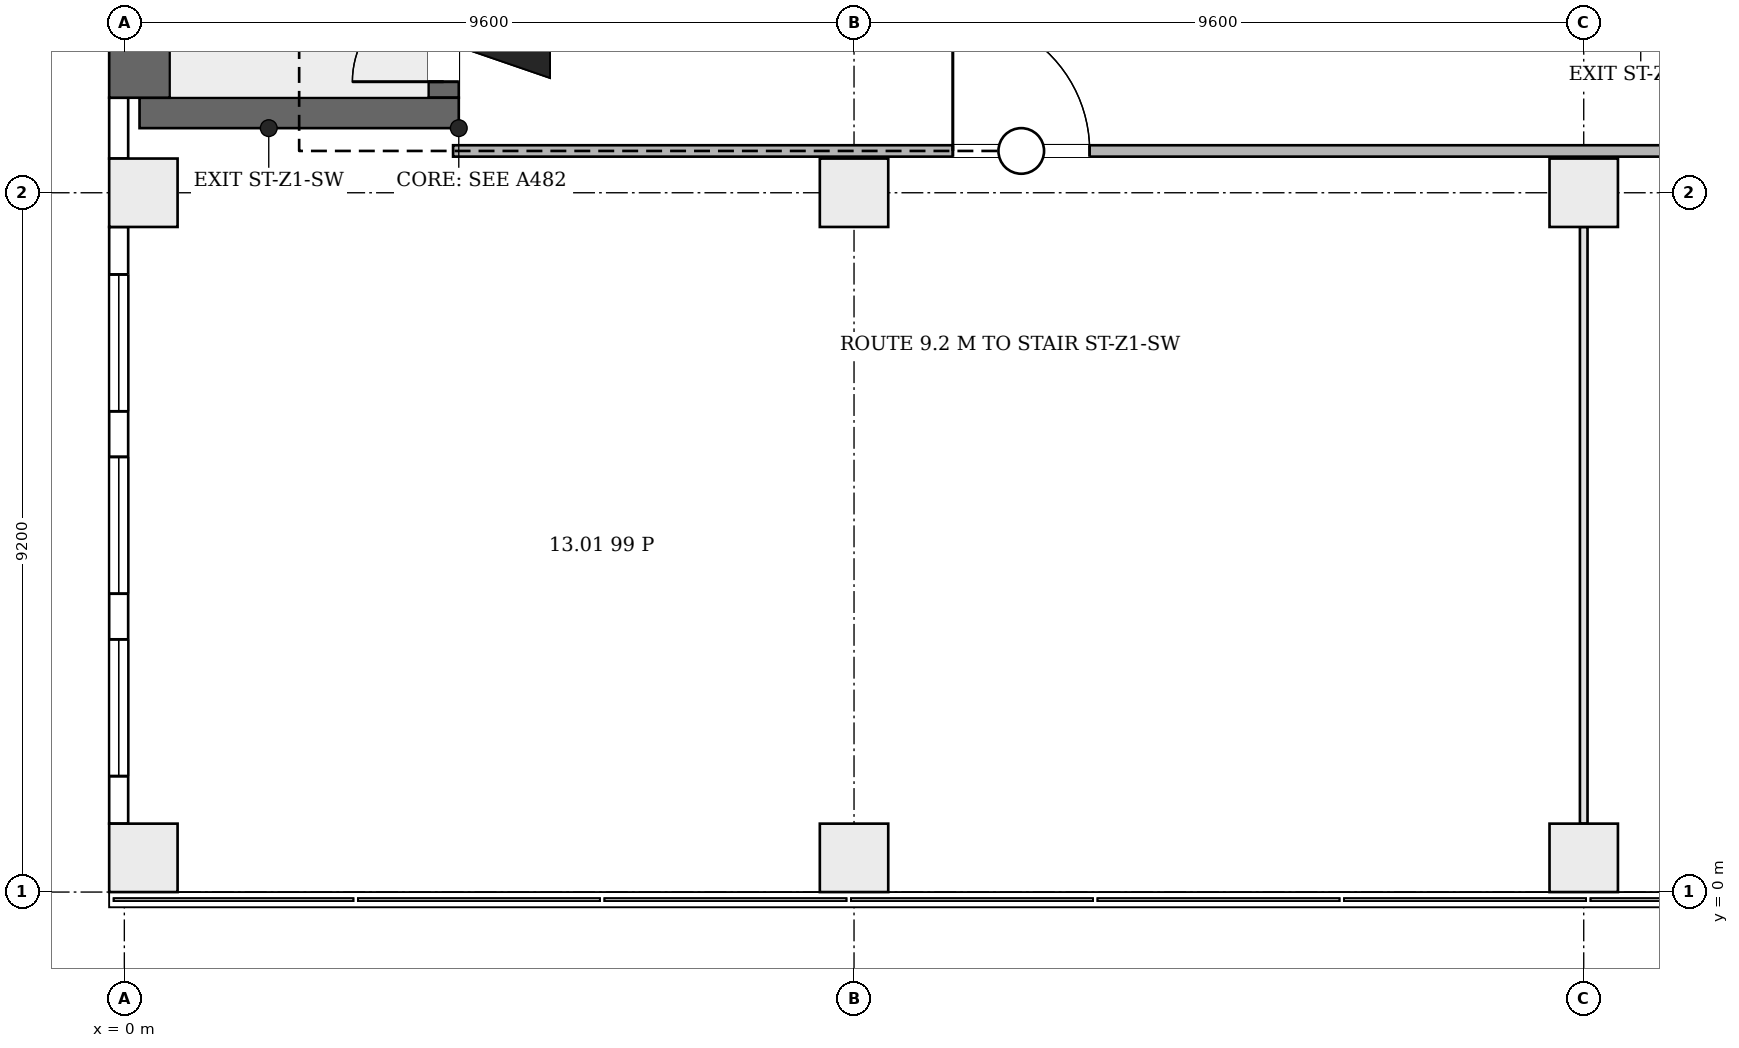
"""IFC4 building model, lengths in metres.
Left out: names, types, materials, properties, quantities, classifications, styles, units other than length and angle.
Written with IfcOpenShell. Run it as: python <this file> out.ifc"""

import sys

from ifc_helpers import new_model, si_unit, direction, frame, frame_2d, origin, origin_2d, place, context, subcontext, project, spatial, rectangle, extrude, element, fill, save


model = new_model("IFC4")
c1 = context("Model", 3, precision=1e-05, world=origin(), true_north=direction((0.0, 1.0)))
c2 = subcontext(c1, "Body", "Model", "MODEL_VIEW")
j1 = project(units=[si_unit("LENGTHUNIT", "METRE"), si_unit("PLANEANGLEUNIT", "RADIAN")], contexts=[c1])
p1 = place(None, origin())
s1 = spatial("IfcSite", under=j1, at=p1, CompositionType="ELEMENT")
p2 = place(p1, origin())
s2 = spatial("IfcBuilding", under=s1, at=p2, CompositionType="ELEMENT")
p3 = place(p2, frame((0.0, 0.0, 65.5)))
s3 = spatial("IfcBuildingStorey", under=s2, at=p3, CompositionType="ELEMENT", Elevation=65.5)
p4 = place(p3, frame((0.2, 10.25, 0.0), z_axis=(0.0, 0.0, 1.0), x_axis=(1.0, 0.0, 0.0)))
e1 = element("IfcWall", 1, at=p4, inside=s3, PredefinedType="SHEAR", context=c2, shape_type="SweptSolid", body=[
    extrude(rectangle(XDim=4.2, YDim=0.4, at=frame_2d((2.1, 0.0))), origin(), (0.0, 0.0, 1.0), 4.2),
])
p5 = place(p3, frame((0.2, 10.45, 0.0), z_axis=(0.0, 0.0, 1.0), x_axis=(0.0, 1.0, 0.0)))
e2 = element("IfcWall", 2, at=p5, inside=s3, PredefinedType="SHEAR", context=c2, shape_type="SweptSolid", body=[
    extrude(rectangle(XDim=6.6, YDim=0.8, at=frame_2d((3.3, 0.0))), origin(), (0.0, 0.0, 1.0), 4.2),
])
p6 = place(p3, frame((4.2, 10.45, 0.0), z_axis=(0.0, 0.0, 1.0), x_axis=(0.0, 1.0, 0.0)))
e3 = element("IfcWall", 3, at=p6, inside=s3, PredefinedType="SHEAR", context=c2, shape_type="SweptSolid", body=[
    extrude(rectangle(XDim=6.6, YDim=0.4, at=frame_2d((3.3, 0.0))), origin(), (0.0, 0.0, 1.0), 4.2),
])
p7 = place(p6, frame((0.21, 0.0, 0.0)))
e4 = element("IfcOpeningElement", 4, at=p7, cuts=e3, PredefinedType="OPENING", context=c2, shape_type="SweptSolid", body=[
    extrude(rectangle(XDim=1.2, YDim=2.1, at=frame_2d((0.6, 1.05))), frame((0.0, 0.21, 0.0), z_axis=(0.0, -1.0, 0.0), x_axis=(1.0, 0.0, 0.0)), (0.0, 0.0, 1.0), 0.42),
])
for number, where, z_axis, x_axis in (
    (5, (0.25, 0.45, 0.0), (0.0, 0.0, 1.0), (1.0, 0.0, 0.0)),
    (6, (9.6, 0.45, 0.0), (0.0, 0.0, 1.0), (1.0, 0.0, 0.0)),
    (7, (19.2, 0.45, 0.0), (0.0, 0.0, 1.0), (1.0, 0.0, 0.0)),
    (8, (0.25, 9.2, 0.0), (0.0, 0.0, 1.0), (1.0, 0.0, 0.0)),
    (9, (9.6, 9.2, 0.0), (0.0, 0.0, 1.0), (1.0, 0.0, 0.0)),
    (10, (19.2, 9.2, 0.0), (0.0, 0.0, 1.0), (1.0, 0.0, 0.0)),
):
    element("IfcColumn", number, at=place(p3, frame(where, z_axis=z_axis, x_axis=x_axis)), inside=s3, PredefinedType="COLUMN", context=c2, shape_type="SweptSolid", body=[
        extrude(rectangle(XDim=0.9, YDim=0.9, at=origin_2d()), origin(), (0.0, 0.0, 1.0), 4.2),
    ])
p8 = place(p3, frame((-0.074, 8.75, 0.0), z_axis=(0.0, 0.0, 1.0), x_axis=(0.0, -1.0, 0.0)))
e11 = element("IfcWall", 11, at=p8, inside=s3, PredefinedType="ELEMENTEDWALL", context=c2, shape_type="SweptSolid", body=[
    extrude(rectangle(XDim=7.85, YDim=0.25, at=frame_2d((3.925, 0.0))), origin(), (0.0, 0.0, 1.0), 3.9),
])
p9 = place(p8, frame((5.425, 0.0, 0.9)))
e12 = element("IfcOpeningElement", 12, at=p9, cuts=e11, PredefinedType="OPENING", context=c2, shape_type="SweptSolid", body=[
    extrude(rectangle(XDim=1.8, YDim=2.6, at=frame_2d((0.9, 1.3))), frame((0.0, 0.135, 0.0), z_axis=(0.0, -1.0, 0.0), x_axis=(1.0, 0.0, 0.0)), (0.0, 0.0, 1.0), 0.27),
])
p10 = place(p8, frame((3.025, 0.0, 0.9)))
e13 = element("IfcOpeningElement", 13, at=p10, cuts=e11, PredefinedType="OPENING", context=c2, shape_type="SweptSolid", body=[
    extrude(rectangle(XDim=1.8, YDim=2.6, at=frame_2d((0.9, 1.3))), frame((0.0, 0.135, 0.0), z_axis=(0.0, -1.0, 0.0), x_axis=(1.0, 0.0, 0.0)), (0.0, 0.0, 1.0), 0.27),
])
p11 = place(p8, frame((0.625, 0.0, 0.9)))
e14 = element("IfcOpeningElement", 14, at=p11, cuts=e11, PredefinedType="OPENING", context=c2, shape_type="SweptSolid", body=[
    extrude(rectangle(XDim=1.8, YDim=2.6, at=frame_2d((0.9, 1.3))), frame((0.0, 0.135, 0.0), z_axis=(0.0, -1.0, 0.0), x_axis=(1.0, 0.0, 0.0)), (0.0, 0.0, 1.0), 0.27),
])
p12 = place(p3, frame((-0.074, 10.45, 0.0), z_axis=(0.0, 0.0, 1.0), x_axis=(0.0, -1.0, 0.0)))
e15 = element("IfcWall", 15, at=p12, inside=s3, PredefinedType="ELEMENTEDWALL", context=c2, shape_type="SweptSolid", body=[
    extrude(rectangle(XDim=0.8, YDim=0.25, at=frame_2d((0.4, 0.0))), origin(), (0.0, 0.0, 1.0), 3.9),
])
p13 = place(p3, frame((4.325, 9.75, 0.0), z_axis=(0.0, 0.0, 1.0), x_axis=(1.0, 0.0, 0.0)))
e16 = element("IfcWall", 16, at=p13, inside=s3, PredefinedType="PARTITIONING", context=c2, shape_type="SweptSolid", body=[
    extrude(rectangle(XDim=43.869, YDim=0.15, at=frame_2d((21.935, 0.0))), origin(), (0.0, 0.0, 1.0), 3.9),
])
p14 = place(p13, frame((6.575, 0.0, 0.0)))
e17 = element("IfcOpeningElement", 17, at=p14, cuts=e16, PredefinedType="OPENING", context=c2, shape_type="SweptSolid", body=[
    extrude(rectangle(XDim=1.8, YDim=2.1, at=frame_2d((0.9, 1.05))), frame((0.0, 0.085, 0.0), z_axis=(0.0, -1.0, 0.0), x_axis=(1.0, 0.0, 0.0)), (0.0, 0.0, 1.0), 0.17),
])
p15 = place(p13, frame((21.175, 0.0, 0.0)))
e18 = element("IfcOpeningElement", 18, at=p15, cuts=e16, PredefinedType="OPENING", context=c2, shape_type="SweptSolid", body=[
    extrude(rectangle(XDim=1.8, YDim=2.1, at=frame_2d((0.9, 1.05))), frame((0.0, 0.085, 0.0), z_axis=(0.0, -1.0, 0.0), x_axis=(1.0, 0.0, 0.0)), (0.0, 0.0, 1.0), 0.17),
])
p16 = place(p13, frame((36.075, 0.0, 0.0)))
e19 = element("IfcOpeningElement", 19, at=p16, cuts=e16, PredefinedType="OPENING", context=c2, shape_type="SweptSolid", body=[
    extrude(rectangle(XDim=1.0, YDim=2.1, at=frame_2d((0.5, 1.05))), frame((0.0, 0.085, 0.0), z_axis=(0.0, -1.0, 0.0), x_axis=(1.0, 0.0, 0.0)), (0.0, 0.0, 1.0), 0.17),
])
p17 = place(p3, frame((19.2, 0.9, 0.0), z_axis=(0.0, 0.0, 1.0), x_axis=(0.0, 1.0, 0.0)))
e20 = element("IfcWall", 20, at=p17, inside=s3, PredefinedType="PARTITIONING", context=c2, shape_type="SweptSolid", body=[
    extrude(rectangle(XDim=7.85, YDim=0.1, at=frame_2d((3.925, 0.0))), origin(), (0.0, 0.0, 1.0), 3.9),
])
p18 = place(p9, origin())
e21 = element("IfcWindow", 21, at=p18, inside=s3, PartitioningType="SINGLE_PANEL", PredefinedType="WINDOW", context=c2, shape_type="SweptSolid", body=[
    extrude(rectangle(XDim=1.8, YDim=2.6, at=frame_2d((0.9, 1.3))), frame((0.0, 0.03, 0.0), z_axis=(0.0, -1.0, 0.0), x_axis=(1.0, 0.0, 0.0)), (0.0, 0.0, 1.0), 0.06),
])
fill(e12, e21)
p19 = place(p10, origin())
e22 = element("IfcWindow", 22, at=p19, inside=s3, PartitioningType="SINGLE_PANEL", PredefinedType="WINDOW", context=c2, shape_type="SweptSolid", body=[
    extrude(rectangle(XDim=1.8, YDim=2.6, at=frame_2d((0.9, 1.3))), frame((0.0, 0.03, 0.0), z_axis=(0.0, -1.0, 0.0), x_axis=(1.0, 0.0, 0.0)), (0.0, 0.0, 1.0), 0.06),
])
fill(e13, e22)
p20 = place(p11, origin())
e23 = element("IfcWindow", 23, at=p20, inside=s3, PartitioningType="SINGLE_PANEL", PredefinedType="WINDOW", context=c2, shape_type="SweptSolid", body=[
    extrude(rectangle(XDim=1.8, YDim=2.6, at=frame_2d((0.9, 1.3))), frame((0.0, 0.03, 0.0), z_axis=(0.0, -1.0, 0.0), x_axis=(1.0, 0.0, 0.0)), (0.0, 0.0, 1.0), 0.06),
])
fill(e14, e23)
p21 = place(p7, origin())
e24 = element("IfcDoor", 24, at=p21, inside=s3, OperationType="SINGLE_SWING_RIGHT", PredefinedType="DOOR", context=c2, shape_type="SweptSolid", body=[
    extrude(rectangle(XDim=1.2, YDim=2.1, at=frame_2d((0.6, 1.05))), frame((0.0, 0.025, 0.0), z_axis=(0.0, -1.0, 0.0), x_axis=(1.0, 0.0, 0.0)), (0.0, 0.0, 1.0), 0.05),
])
fill(e4, e24)
p22 = place(p14, origin())
e25 = element("IfcDoor", 25, at=p22, inside=s3, OperationType="DOUBLE_DOOR_SINGLE_SWING", PredefinedType="DOOR", context=c2, shape_type="SweptSolid", body=[
    extrude(rectangle(XDim=1.8, YDim=2.1, at=frame_2d((0.9, 1.05))), frame((0.0, 0.025, 0.0), z_axis=(0.0, -1.0, 0.0), x_axis=(1.0, 0.0, 0.0)), (0.0, 0.0, 1.0), 0.05),
])
fill(e17, e25)
save(model, sys.argv[1])
